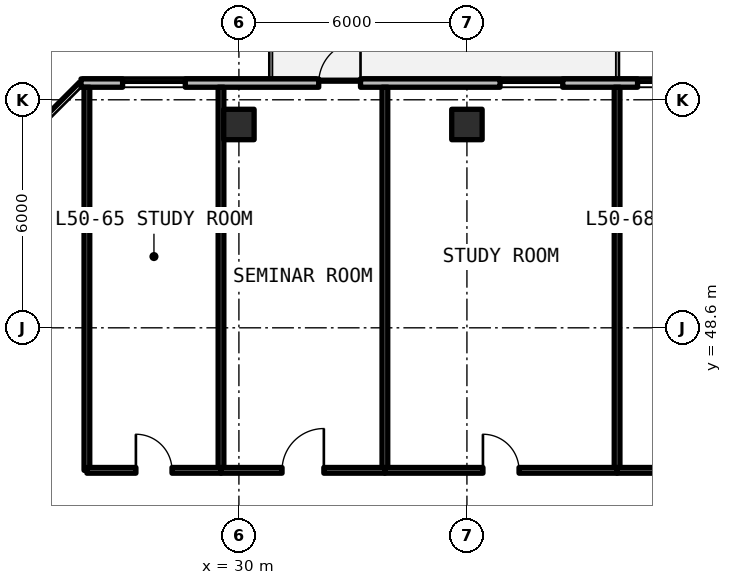
"""IFC4 building model, lengths in metres.
Left out: names, types, materials, properties, quantities, classifications, styles, units other than length and angle.
Written with IfcOpenShell. Run it as: python <this file> out.ifc"""

import sys

from ifc_helpers import new_model, si_unit, direction, frame, frame_2d, origin, origin_2d, place, context, subcontext, project, spatial, rectangle, extrude, element, fill, save


model = new_model("IFC4")
c1 = context("Model", 3, precision=1e-05, world=origin(), true_north=direction((0.0, 1.0)))
c2 = subcontext(c1, "Body", "Model", "MODEL_VIEW")
j1 = project(units=[si_unit("LENGTHUNIT", "METRE"), si_unit("PLANEANGLEUNIT", "RADIAN")], contexts=[c1])
p1 = place(None, origin())
s1 = spatial("IfcSite", under=j1, at=p1, CompositionType="ELEMENT")
p2 = place(p1, origin())
s2 = spatial("IfcBuilding", under=s1, at=p2, CompositionType="ELEMENT")
p3 = place(p2, frame((0.0, 0.0, 181.83)))
s3 = spatial("IfcBuildingStorey", under=s2, at=p3, CompositionType="ELEMENT", Elevation=181.83)
for number, where, z_axis, x_axis in (
    (1, (30.0, 53.95, 0.0), (0.0, 0.0, 1.0), (1.0, 0.0, 0.0)),
    (2, (36.0, 53.95, 0.0), (0.0, 0.0, 1.0), (1.0, 0.0, 0.0)),
):
    element("IfcColumn", number, at=place(p3, frame(where, z_axis=z_axis, x_axis=x_axis)), inside=s3, PredefinedType="COLUMN", context=c2, shape_type="SweptSolid", body=[
        extrude(rectangle(XDim=0.8, YDim=0.8, at=origin_2d()), origin(), (0.0, 0.0, 1.0), 3.3),
    ])
p4 = place(p3, frame((43.49, 55.04, 0.0), z_axis=(0.0, 0.0, 1.0), x_axis=(-1.0, 0.0, 0.0)))
e3 = element("IfcWall", 3, at=p4, inside=s3, PredefinedType="SOLIDWALL", context=c2, shape_type="SweptSolid", body=[
    extrude(rectangle(XDim=17.644, YDim=0.22, at=frame_2d((8.822, 0.0))), origin(), (0.0, 0.0, 1.0), 3.08),
])
p5 = place(p4, frame((10.29, 0.0, 0.0)))
e4 = element("IfcOpeningElement", 4, at=p5, cuts=e3, PredefinedType="OPENING", context=c2, shape_type="SweptSolid", body=[
    extrude(rectangle(XDim=1.1, YDim=2.15, at=frame_2d((0.55, 1.075))), frame((0.0, 0.12, 0.0), z_axis=(0.0, -1.0, 0.0), x_axis=(1.0, 0.0, 0.0)), (0.0, 0.0, 1.0), 0.24),
])
p6 = place(p4, frame((14.901, 0.0, 0.78)))
e5 = element("IfcOpeningElement", 5, at=p6, cuts=e3, PredefinedType="OPENING", context=c2, shape_type="SweptSolid", body=[
    extrude(rectangle(XDim=1.65, YDim=1.66, at=frame_2d((0.825, 0.83))), frame((0.0, 0.12, 0.0), z_axis=(0.0, -1.0, 0.0), x_axis=(1.0, 0.0, 0.0)), (0.0, 0.0, 1.0), 0.24),
])
p7 = place(p4, frame((4.969, 0.0, 0.78)))
e6 = element("IfcOpeningElement", 6, at=p7, cuts=e3, PredefinedType="OPENING", context=c2, shape_type="SweptSolid", body=[
    extrude(rectangle(XDim=1.65, YDim=1.66, at=frame_2d((0.825, 0.83))), frame((0.0, 0.12, 0.0), z_axis=(0.0, -1.0, 0.0), x_axis=(1.0, 0.0, 0.0)), (0.0, 0.0, 1.0), 0.24),
])
p8 = place(p4, frame((2.149, 0.0, 0.78)))
e7 = element("IfcOpeningElement", 7, at=p8, cuts=e3, PredefinedType="OPENING", context=c2, shape_type="SweptSolid", body=[
    extrude(rectangle(XDim=0.85, YDim=1.65, at=frame_2d((0.425, 0.825))), frame((0.0, 0.12, 0.0), z_axis=(0.0, -1.0, 0.0), x_axis=(1.0, 0.0, 0.0)), (0.0, 0.0, 1.0), 0.24),
])
for number, where, z_axis, x_axis in (
    (8, (26.0, 44.85, 0.0), (0.0, 0.0, 1.0), (0.0, 1.0, 0.0)),
    (9, (29.529, 44.85, 0.0), (0.0, 0.0, 1.0), (0.0, 1.0, 0.0)),
):
    element("IfcWall", number, at=place(p3, frame(where, z_axis=z_axis, x_axis=x_axis)), inside=s3, PredefinedType="SOLIDWALL", context=c2, shape_type="SweptSolid", body=[
        extrude(rectangle(XDim=10.08, YDim=0.15, at=frame_2d((5.04, 0.0))), origin(), (0.0, 0.0, 1.0), 2.35),
    ])
p9 = place(p3, frame((26.0, 44.85, 0.0), z_axis=(0.0, 0.0, 1.0), x_axis=(1.0, 0.0, 0.0)))
e10 = element("IfcWall", 10, at=p9, inside=s3, PredefinedType="SOLIDWALL", context=c2, shape_type="SweptSolid", body=[
    extrude(rectangle(XDim=3.529, YDim=0.15, at=frame_2d((1.764, 0.0))), origin(), (0.0, 0.0, 1.0), 2.35),
])
p10 = place(p9, frame((1.289, 0.0, 0.0)))
e11 = element("IfcOpeningElement", 11, at=p10, cuts=e10, PredefinedType="OPENING", context=c2, shape_type="SweptSolid", body=[
    extrude(rectangle(XDim=0.95, YDim=2.15, at=frame_2d((0.475, 1.075))), frame((0.0, 0.085, 0.0), z_axis=(0.0, -1.0, 0.0), x_axis=(1.0, 0.0, 0.0)), (0.0, 0.0, 1.0), 0.17),
])
p11 = place(p3, frame((33.842, 44.85, 0.0), z_axis=(0.0, 0.0, 1.0), x_axis=(0.0, 1.0, 0.0)))
e12 = element("IfcWall", 12, at=p11, inside=s3, PredefinedType="SOLIDWALL", context=c2, shape_type="SweptSolid", body=[
    extrude(rectangle(XDim=10.08, YDim=0.15, at=frame_2d((5.04, 0.0))), origin(), (0.0, 0.0, 1.0), 2.35),
])
p12 = place(p3, frame((29.529, 44.85, 0.0), z_axis=(0.0, 0.0, 1.0), x_axis=(1.0, 0.0, 0.0)))
e13 = element("IfcWall", 13, at=p12, inside=s3, PredefinedType="SOLIDWALL", context=c2, shape_type="SweptSolid", body=[
    extrude(rectangle(XDim=4.313, YDim=0.15, at=frame_2d((2.156, 0.0))), origin(), (0.0, 0.0, 1.0), 2.35),
])
p13 = place(p12, frame((1.606, 0.0, 0.0)))
e14 = element("IfcOpeningElement", 14, at=p13, cuts=e13, PredefinedType="OPENING", context=c2, shape_type="SweptSolid", body=[
    extrude(rectangle(XDim=1.1, YDim=2.15, at=frame_2d((0.55, 1.075))), frame((0.0, 0.085, 0.0), z_axis=(0.0, -1.0, 0.0), x_axis=(1.0, 0.0, 0.0)), (0.0, 0.0, 1.0), 0.17),
])
p14 = place(p3, frame((39.951, 44.85, 0.0), z_axis=(0.0, 0.0, 1.0), x_axis=(0.0, 1.0, 0.0)))
e15 = element("IfcWall", 15, at=p14, inside=s3, PredefinedType="SOLIDWALL", context=c2, shape_type="SweptSolid", body=[
    extrude(rectangle(XDim=10.08, YDim=0.15, at=frame_2d((5.04, 0.0))), origin(), (0.0, 0.0, 1.0), 2.35),
])
p15 = place(p3, frame((33.842, 44.85, 0.0), z_axis=(0.0, 0.0, 1.0), x_axis=(1.0, 0.0, 0.0)))
e16 = element("IfcWall", 16, at=p15, inside=s3, PredefinedType="SOLIDWALL", context=c2, shape_type="SweptSolid", body=[
    extrude(rectangle(XDim=6.11, YDim=0.15, at=frame_2d((3.055, 0.0))), origin(), (0.0, 0.0, 1.0), 2.35),
])
p16 = place(p15, frame((2.58, 0.0, 0.0)))
e17 = element("IfcOpeningElement", 17, at=p16, cuts=e16, PredefinedType="OPENING", context=c2, shape_type="SweptSolid", body=[
    extrude(rectangle(XDim=0.95, YDim=2.15, at=frame_2d((0.475, 1.075))), frame((0.0, 0.085, 0.0), z_axis=(0.0, -1.0, 0.0), x_axis=(1.0, 0.0, 0.0)), (0.0, 0.0, 1.0), 0.17),
])
p17 = place(p3, frame((39.951, 44.85, 0.0), z_axis=(0.0, 0.0, 1.0), x_axis=(1.0, 0.0, 0.0)))
e18 = element("IfcWall", 18, at=p17, inside=s3, PredefinedType="SOLIDWALL", context=c2, shape_type="SweptSolid", body=[
    extrude(rectangle(XDim=3.529, YDim=0.15, at=frame_2d((1.764, 0.0))), origin(), (0.0, 0.0, 1.0), 2.35),
])
p18 = place(p17, frame((1.289, 0.0, 0.0)))
e19 = element("IfcOpeningElement", 19, at=p18, cuts=e18, PredefinedType="OPENING", context=c2, shape_type="SweptSolid", body=[
    extrude(rectangle(XDim=0.95, YDim=2.15, at=frame_2d((0.475, 1.075))), frame((0.0, 0.085, 0.0), z_axis=(0.0, -1.0, 0.0), x_axis=(1.0, 0.0, 0.0)), (0.0, 0.0, 1.0), 0.17),
])
p19 = place(p5, frame((1.1, 0.0, 0.0), z_axis=(0.0, 0.0, 1.0), x_axis=(-1.0, 0.0, 0.0)))
e20 = element("IfcDoor", 20, at=p19, inside=s3, OperationType="SINGLE_SWING_LEFT", PredefinedType="DOOR", context=c2, shape_type="SweptSolid", body=[
    extrude(rectangle(XDim=1.1, YDim=2.15, at=frame_2d((0.55, 1.075))), frame((0.0, 0.025, 0.0), z_axis=(0.0, -1.0, 0.0), x_axis=(1.0, 0.0, 0.0)), (0.0, 0.0, 1.0), 0.05),
])
fill(e4, e20)
p20 = place(p6, origin())
e21 = element("IfcWindow", 21, at=p20, inside=s3, PartitioningType="SINGLE_PANEL", PredefinedType="WINDOW", context=c2, shape_type="SweptSolid", body=[
    extrude(rectangle(XDim=1.65, YDim=1.66, at=frame_2d((0.825, 0.83))), frame((0.0, 0.03, 0.0), z_axis=(0.0, -1.0, 0.0), x_axis=(1.0, 0.0, 0.0)), (0.0, 0.0, 1.0), 0.06),
])
fill(e5, e21)
p21 = place(p7, origin())
e22 = element("IfcWindow", 22, at=p21, inside=s3, PartitioningType="SINGLE_PANEL", PredefinedType="WINDOW", context=c2, shape_type="SweptSolid", body=[
    extrude(rectangle(XDim=1.65, YDim=1.66, at=frame_2d((0.825, 0.83))), frame((0.0, 0.03, 0.0), z_axis=(0.0, -1.0, 0.0), x_axis=(1.0, 0.0, 0.0)), (0.0, 0.0, 1.0), 0.06),
])
fill(e6, e22)
p22 = place(p8, origin())
e23 = element("IfcWindow", 23, at=p22, inside=s3, PartitioningType="SINGLE_PANEL", PredefinedType="WINDOW", context=c2, shape_type="SweptSolid", body=[
    extrude(rectangle(XDim=0.85, YDim=1.65, at=frame_2d((0.425, 0.825))), frame((0.0, 0.03, 0.0), z_axis=(0.0, -1.0, 0.0), x_axis=(1.0, 0.0, 0.0)), (0.0, 0.0, 1.0), 0.06),
])
fill(e7, e23)
p23 = place(p10, origin())
e24 = element("IfcDoor", 24, at=p23, inside=s3, OperationType="SINGLE_SWING_LEFT", PredefinedType="DOOR", context=c2, shape_type="SweptSolid", body=[
    extrude(rectangle(XDim=0.95, YDim=2.15, at=frame_2d((0.475, 1.075))), frame((0.0, 0.025, 0.0), z_axis=(0.0, -1.0, 0.0), x_axis=(1.0, 0.0, 0.0)), (0.0, 0.0, 1.0), 0.05),
])
fill(e11, e24)
p24 = place(p13, origin())
e25 = element("IfcDoor", 25, at=p24, inside=s3, OperationType="SINGLE_SWING_RIGHT", PredefinedType="DOOR", context=c2, shape_type="SweptSolid", body=[
    extrude(rectangle(XDim=1.1, YDim=2.15, at=frame_2d((0.55, 1.075))), frame((0.0, 0.025, 0.0), z_axis=(0.0, -1.0, 0.0), x_axis=(1.0, 0.0, 0.0)), (0.0, 0.0, 1.0), 0.05),
])
fill(e14, e25)
p25 = place(p16, origin())
e26 = element("IfcDoor", 26, at=p25, inside=s3, OperationType="SINGLE_SWING_LEFT", PredefinedType="DOOR", context=c2, shape_type="SweptSolid", body=[
    extrude(rectangle(XDim=0.95, YDim=2.15, at=frame_2d((0.475, 1.075))), frame((0.0, 0.025, 0.0), z_axis=(0.0, -1.0, 0.0), x_axis=(1.0, 0.0, 0.0)), (0.0, 0.0, 1.0), 0.05),
])
fill(e17, e26)
save(model, sys.argv[1])
